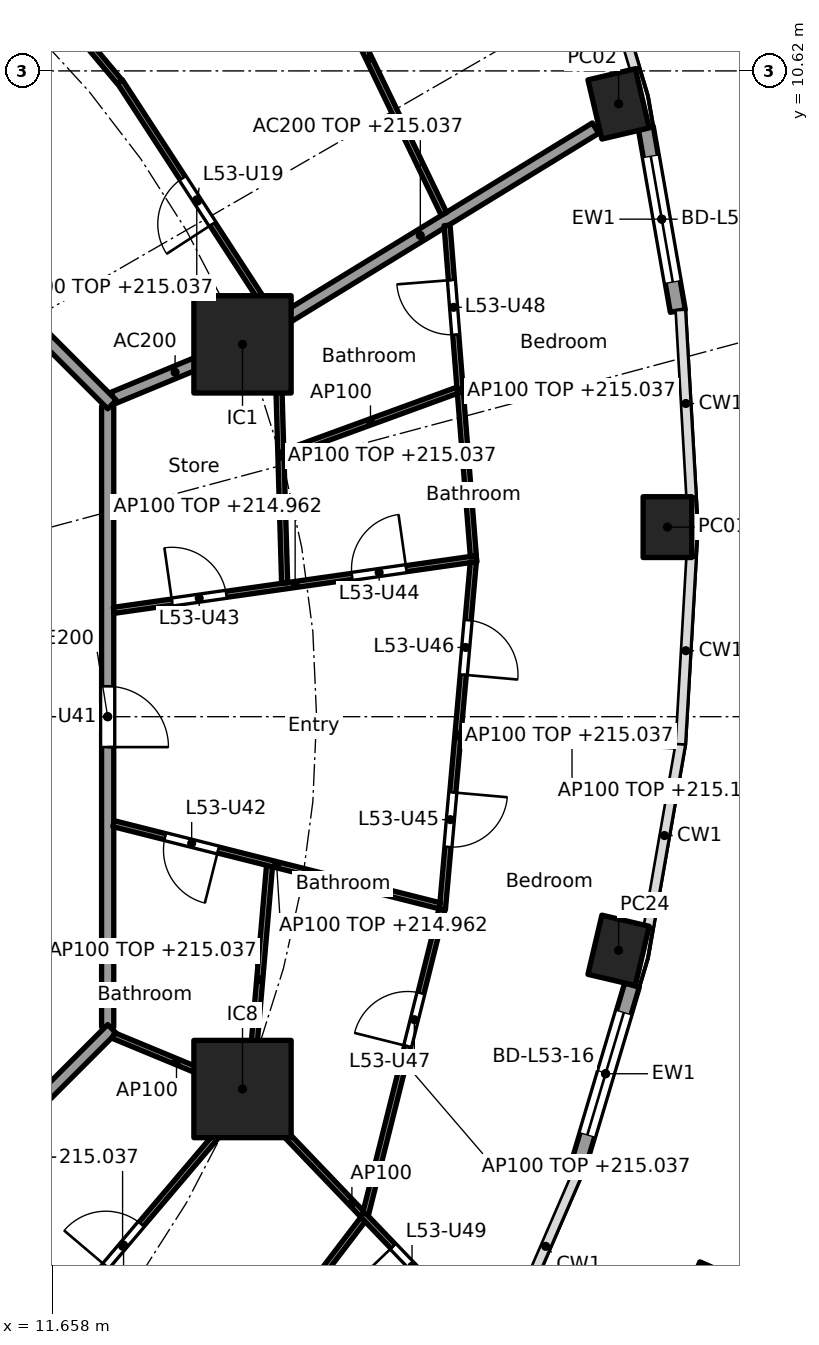
"""IFC4 building model, lengths in metres.
Left out: names, types, materials, properties, quantities, classifications, styles, units other than length and angle.
Written with IfcOpenShell. Run it as: python <this file> out.ifc"""

import sys

from ifc_helpers import new_model, si_unit, direction, frame, frame_2d, origin, origin_2d, place, context, subcontext, project, spatial, rectangle, hollow_rectangle, extrude, element, fill, save


model = new_model("IFC4")
c1 = context("Model", 3, precision=1e-05, world=origin(), true_north=direction((0.0, 1.0)))
c2 = subcontext(c1, "Body", "Model", "MODEL_VIEW")
j1 = project(units=[si_unit("LENGTHUNIT", "METRE"), si_unit("PLANEANGLEUNIT", "RADIAN")], contexts=[c1])
p1 = place(None, origin())
s1 = spatial("IfcSite", under=j1, at=p1, CompositionType="ELEMENT")
p2 = place(p1, origin())
s2 = spatial("IfcBuilding", under=s1, at=p2, CompositionType="ELEMENT")
p3 = place(p2, frame((0.0, 0.0, 212.2)))
s3 = spatial("IfcBuildingStorey", under=s2, at=p3, CompositionType="ELEMENT", Elevation=212.2)
for number, where, z_axis, x_axis in (
    (1, (21.77, 3.118, -0.26), (0.0, 0.0, 1.0), (0.0, 1.0, 0.0)),
    (2, (20.967, 10.077, -0.26), (0.0, 0.0, 1.0), (-0.229, 0.973, 0.0)),
    (3, (20.967, -3.842, -0.26), (0.0, 0.0, 1.0), (0.229, 0.973, 0.0)),
):
    element("IfcColumn", number, at=place(p3, frame(where, z_axis=z_axis, x_axis=x_axis)), inside=s3, PredefinedType="COLUMN", context=c2, shape_type="SweptSolid", body=[
        extrude(hollow_rectangle(XDim=1.0, YDim=0.8, WallThickness=0.032, at=origin_2d()), origin(), (0.0, 0.0, 1.0), 3.96),
    ])
for number, where, z_axis, x_axis in (
    (4, (14.782, 6.123, 0.0), (0.0, 0.0, 1.0), (1.0, 0.0, 0.0)),
    (5, (14.782, -6.123, 0.0), (0.0, 0.0, 1.0), (1.0, 0.0, 0.0)),
):
    element("IfcColumn", number, at=place(p3, frame(where, z_axis=z_axis, x_axis=x_axis)), inside=s3, PredefinedType="COLUMN", context=c2, shape_type="SweptSolid", body=[
        extrude(rectangle(XDim=1.6, YDim=1.6, at=origin_2d()), origin(), (0.0, 0.0, 1.0), 3.7),
    ])
p4 = place(p3, frame((21.413, 9.693, 0.0), z_axis=(0.0, 0.0, 1.0), x_axis=(0.172177583768, -0.985065926549, 0.0)))
e6 = element("IfcWall", 6, at=p4, inside=s3, PredefinedType="SOLIDWALL", context=c2, shape_type="SweptSolid", body=[
    extrude(rectangle(XDim=3.067, YDim=0.25, at=frame_2d((1.534, 0.0))), origin(), (0.0, 0.0, 1.0), 3.44),
])
p5 = place(p4, frame((0.484, 0.0, 0.0)))
e7 = element("IfcOpeningElement", 7, at=p5, cuts=e6, PredefinedType="OPENING", context=c2, shape_type="SweptSolid", body=[
    extrude(rectangle(XDim=2.1, YDim=2.4, at=frame_2d((1.05, 1.2))), frame((0.0, 0.135, 0.0), z_axis=(0.0, -1.0, 0.0), x_axis=(1.0, 0.0, 0.0)), (0.0, 0.0, 1.0), 0.27),
])
p6 = place(p3, frame((21.187, -4.415, 0.0), z_axis=(0.0, 0.0, 1.0), x_axis=(-0.285785716255, -0.958293548128, 0.0)))
e8 = element("IfcWall", 8, at=p6, inside=s3, PredefinedType="SOLIDWALL", context=c2, shape_type="SweptSolid", body=[
    extrude(rectangle(XDim=3.04, YDim=0.25, at=frame_2d((1.52, 0.0))), origin(), (0.0, 0.0, 1.0), 3.44),
])
p7 = place(p6, frame((0.47, 0.0, 0.0)))
e9 = element("IfcOpeningElement", 9, at=p7, cuts=e8, PredefinedType="OPENING", context=c2, shape_type="SweptSolid", body=[
    extrude(rectangle(XDim=2.1, YDim=2.4, at=frame_2d((1.05, 1.2))), frame((0.0, 0.135, 0.0), z_axis=(0.0, -1.0, 0.0), x_axis=(1.0, 0.0, 0.0)), (0.0, 0.0, 1.0), 0.27),
])
p8 = place(p3, frame((22.714, 16.705, 0.0), z_axis=(0.0, 0.0, 1.0), x_axis=(0.397501798616, -0.917601394995, 0.0)))
e10 = element("IfcWall", 10, at=p8, inside=s3, PredefinedType="SOLIDWALL", context=c2, shape_type="SweptSolid", body=[
    extrude(rectangle(XDim=10.248, YDim=1.6, at=frame_2d((5.124, 0.0))), origin(), (0.0, 0.0, 1.0), 1.1),
])
p9 = place(p3, frame((20.343, -15.443, 0.0), z_axis=(0.0, 0.0, 1.0), x_axis=(0.400883628547, 0.916128984567, 0.0)))
e11 = element("IfcWall", 11, at=p9, inside=s3, PredefinedType="SOLIDWALL", context=c2, shape_type="SweptSolid", body=[
    extrude(rectangle(XDim=6.72, YDim=1.6, at=frame_2d((3.36, 0.0))), origin(), (0.0, 0.0, 1.0), 1.1),
])
p10 = place(p3, frame((12.657, 5.243, 0.0), z_axis=(0.0, 0.0, 1.0), x_axis=(0.92383017907, 0.382802560388, 0.0)))
e12 = element("IfcWall", 12, at=p10, inside=s3, PredefinedType="PARTITIONING", context=c2, shape_type="SweptSolid", body=[
    extrude(rectangle(XDim=2.2, YDim=0.2, at=frame_2d((1.1, 0.0))), origin(), (0.0, 0.0, 1.0), 3.44),
])
p11 = place(p3, frame((14.825, 6.149, 0.0), z_axis=(0.0, 0.0, 1.0), x_axis=(0.852781365284, 0.522268075824, 0.0)))
e13 = element("IfcWall", 13, at=p11, inside=s3, PredefinedType="PARTITIONING", context=c2, shape_type="SweptSolid", body=[
    extrude(rectangle(XDim=6.758, YDim=0.2, at=frame_2d((3.379, 0.0))), origin(), (0.0, 0.0, 1.0), 2.837),
])
p12 = place(p3, frame((12.565, -5.104, 0.0), z_axis=(0.0, 0.0, 1.0), x_axis=(0.0, 1.0, 0.0)))
e14 = element("IfcWall", 14, at=p12, inside=s3, PredefinedType="PARTITIONING", context=c2, shape_type="SweptSolid", body=[
    extrude(rectangle(XDim=10.209, YDim=0.2, at=frame_2d((5.104, 0.0))), origin(), (0.0, 0.0, 1.0), 3.44),
])
p13 = place(p12, frame((4.604, 0.0, 0.0)))
e15 = element("IfcOpeningElement", 15, at=p13, cuts=e14, PredefinedType="OPENING", context=c2, shape_type="SweptSolid", body=[
    extrude(rectangle(XDim=1.0, YDim=2.1, at=frame_2d((0.5, 1.05))), frame((0.0, 0.11, 0.0), z_axis=(0.0, -1.0, 0.0), x_axis=(1.0, 0.0, 0.0)), (0.0, 0.0, 1.0), 0.22),
])
p14 = place(p3, frame((12.635, 5.134, 0.0), z_axis=(0.0, 0.0, 1.0), x_axis=(-0.707106781187, 0.707106781187, 0.0)))
e16 = element("IfcWall", 16, at=p14, inside=s3, PredefinedType="PARTITIONING", context=c2, shape_type="SweptSolid", body=[
    extrude(rectangle(XDim=10.609, YDim=0.2, at=frame_2d((5.305, 0.0))), origin(), (0.0, 0.0, 1.0), 3.44),
])
p15 = place(p3, frame((5.275, -12.494, 0.0), z_axis=(0.0, 0.0, 1.0), x_axis=(0.707106781187, 0.707106781187, 0.0)))
e17 = element("IfcWall", 17, at=p15, inside=s3, PredefinedType="PARTITIONING", context=c2, shape_type="SweptSolid", body=[
    extrude(rectangle(XDim=10.409, YDim=0.2, at=frame_2d((5.205, 0.0))), origin(), (0.0, 0.0, 1.0), 3.44),
])
p16 = place(p3, frame((12.664, 1.749, 0.0), z_axis=(0.0, 0.0, 1.0), x_axis=(0.990000460163, 0.141064130369, 0.0)))
e18 = element("IfcWall", 18, at=p16, inside=s3, PredefinedType="PARTITIONING", context=c2, shape_type="SweptSolid", body=[
    extrude(rectangle(XDim=6.028, YDim=0.1, at=frame_2d((3.014, 0.0))), origin(), (0.0, 0.0, 1.0), 2.762),
])
p17 = place(p16, frame((0.97, 0.0, 0.0)))
e19 = element("IfcOpeningElement", 19, at=p17, cuts=e18, PredefinedType="OPENING", context=c2, shape_type="SweptSolid", body=[
    extrude(rectangle(XDim=0.9, YDim=2.1, at=frame_2d((0.45, 1.05))), frame((0.0, 0.06, 0.0), z_axis=(0.0, -1.0, 0.0), x_axis=(1.0, 0.0, 0.0)), (0.0, 0.0, 1.0), 0.12),
])
p18 = place(p16, frame((3.959, 0.0, 0.0)))
e20 = element("IfcOpeningElement", 20, at=p18, cuts=e18, PredefinedType="OPENING", context=c2, shape_type="SweptSolid", body=[
    extrude(rectangle(XDim=0.9, YDim=2.1, at=frame_2d((0.45, 1.05))), frame((0.0, 0.06, 0.0), z_axis=(0.0, -1.0, 0.0), x_axis=(1.0, 0.0, 0.0)), (0.0, 0.0, 1.0), 0.12),
])
p19 = place(p3, frame((15.475, 2.2, 0.0), z_axis=(0.0, 0.0, 1.0), x_axis=(-0.029254623973, 0.999571991893, 0.0)))
e21 = element("IfcWall", 21, at=p19, inside=s3, PredefinedType="PARTITIONING", context=c2, shape_type="SweptSolid", body=[
    extrude(rectangle(XDim=4.173, YDim=0.1, at=frame_2d((2.086, 0.0))), origin(), (0.0, 0.0, 1.0), 2.837),
])
p20 = place(p3, frame((18.578, 2.642, 0.0), z_axis=(0.0, 0.0, 1.0), x_axis=(-0.079188322924, 0.996859673932, 0.0)))
e22 = element("IfcWall", 22, at=p20, inside=s3, PredefinedType="PARTITIONING", context=c2, shape_type="SweptSolid", body=[
    extrude(rectangle(XDim=5.454, YDim=0.1, at=frame_2d((2.727, 0.0))), origin(), (0.0, 0.0, 1.0), 2.837),
])
p21 = place(p20, frame((3.653, 0.0, 0.0)))
e23 = element("IfcOpeningElement", 23, at=p21, cuts=e22, PredefinedType="OPENING", context=c2, shape_type="SweptSolid", body=[
    extrude(rectangle(XDim=0.9, YDim=2.1, at=frame_2d((0.45, 1.05))), frame((0.0, 0.06, 0.0), z_axis=(0.0, -1.0, 0.0), x_axis=(1.0, 0.0, 0.0)), (0.0, 0.0, 1.0), 0.12),
])
p22 = place(p3, frame((18.578, 2.542, 0.0), z_axis=(0.0, 0.0, 1.0), x_axis=(-0.088651453697, -0.996062708748, 0.0)))
e24 = element("IfcWall", 24, at=p22, inside=s3, PredefinedType="PARTITIONING", context=c2, shape_type="SweptSolid", body=[
    extrude(rectangle(XDim=5.737, YDim=0.1, at=frame_2d((2.868, 0.0))), origin(), (0.0, 0.0, 1.0), 2.837),
])
p23 = place(p22, frame((3.802, 0.0, 0.0)))
e25 = element("IfcOpeningElement", 25, at=p23, cuts=e24, PredefinedType="OPENING", context=c2, shape_type="SweptSolid", body=[
    extrude(rectangle(XDim=0.9, YDim=2.1, at=frame_2d((0.45, 1.05))), frame((0.0, 0.06, 0.0), z_axis=(0.0, -1.0, 0.0), x_axis=(1.0, 0.0, 0.0)), (0.0, 0.0, 1.0), 0.12),
])
p24 = place(p22, frame((0.959, 0.0, 0.0)))
e26 = element("IfcOpeningElement", 26, at=p24, cuts=e24, PredefinedType="OPENING", context=c2, shape_type="SweptSolid", body=[
    extrude(rectangle(XDim=0.9, YDim=2.1, at=frame_2d((0.45, 1.05))), frame((0.0, 0.06, 0.0), z_axis=(0.0, -1.0, 0.0), x_axis=(1.0, 0.0, 0.0)), (0.0, 0.0, 1.0), 0.12),
])
p25 = place(p3, frame((15.46, 4.327, 0.0), z_axis=(0.0, 0.0, 1.0), x_axis=(0.939452643938, 0.342678755977, 0.0)))
e27 = element("IfcWall", 27, at=p25, inside=s3, PredefinedType="PARTITIONING", context=c2, shape_type="SweptSolid", body=[
    extrude(rectangle(XDim=3.037, YDim=0.1, at=frame_2d((1.519, 0.0))), origin(), (0.0, 0.0, 1.0), 3.44),
])
p26 = place(p3, frame((15.295, 6.554, 0.0), z_axis=(0.0, 0.0, 1.0), x_axis=(-0.545186120363, 0.838315032767, 0.0)))
e28 = element("IfcWall", 28, at=p26, inside=s3, PredefinedType="PARTITIONING", context=c2, shape_type="SweptSolid", body=[
    extrude(rectangle(XDim=4.643, YDim=0.1, at=frame_2d((2.321, 0.0))), origin(), (0.0, 0.0, 1.0), 2.837),
])
p27 = place(p26, frame((1.846, 0.0, 0.0)))
e29 = element("IfcOpeningElement", 29, at=p27, cuts=e28, PredefinedType="OPENING", context=c2, shape_type="SweptSolid", body=[
    extrude(rectangle(XDim=0.9, YDim=2.1, at=frame_2d((0.45, 1.05))), frame((0.0, 0.06, 0.0), z_axis=(0.0, -1.0, 0.0), x_axis=(1.0, 0.0, 0.0)), (0.0, 0.0, 1.0), 0.12),
])
p28 = place(p3, frame((18.095, 8.269, 0.0), z_axis=(0.0, 0.0, 1.0), x_axis=(-0.434640773561, 0.900603907363, 0.0)))
e30 = element("IfcWall", 30, at=p28, inside=s3, PredefinedType="PARTITIONING", context=c2, shape_type="SweptSolid", body=[
    extrude(rectangle(XDim=5.674, YDim=0.1, at=frame_2d((2.837, 0.0))), origin(), (0.0, 0.0, 1.0), 2.837),
])
p29 = place(p3, frame((12.759, 10.443, 0.0), z_axis=(0.0, 0.0, 1.0), x_axis=(-0.642225196965, 0.766516011825, 0.0)))
e31 = element("IfcWall", 31, at=p29, inside=s3, PredefinedType="PARTITIONING", context=c2, shape_type="SweptSolid", body=[
    extrude(rectangle(XDim=4.361, YDim=0.1, at=frame_2d((2.18, 0.0))), origin(), (0.0, 0.0, 1.0), 2.837),
])
p30 = place(p3, frame((7.71, 10.197, 0.0), z_axis=(0.0, 0.0, 1.0), x_axis=(0.521477621335, 0.853264959111, 0.0)))
e32 = element("IfcWall", 32, at=p30, inside=s3, PredefinedType="PARTITIONING", context=c2, shape_type="SweptSolid", body=[
    extrude(rectangle(XDim=8.941, YDim=0.1, at=frame_2d((4.471, 0.0))), origin(), (0.0, 0.0, 1.0), 2.762),
])
p31 = place(p30, frame((6.121, 0.0, 0.0)))
e33 = element("IfcOpeningElement", 33, at=p31, cuts=e32, PredefinedType="OPENING", context=c2, shape_type="SweptSolid", body=[
    extrude(rectangle(XDim=0.9, YDim=2.1, at=frame_2d((0.45, 1.05))), frame((0.0, 0.06, 0.0), z_axis=(0.0, -1.0, 0.0), x_axis=(1.0, 0.0, 0.0)), (0.0, 0.0, 1.0), 0.12),
])
p32 = place(p3, frame((10.753, -11.132, 0.0), z_axis=(0.0, 0.0, 1.0), x_axis=(0.647001799757, 0.762488472773, 0.0)))
e34 = element("IfcWall", 34, at=p32, inside=s3, PredefinedType="PARTITIONING", context=c2, shape_type="SweptSolid", body=[
    extrude(rectangle(XDim=6.359, YDim=0.1, at=frame_2d((3.179, 0.0))), origin(), (0.0, 0.0, 1.0), 2.837),
])
p33 = place(p32, frame((2.754, 0.0, 0.0)))
e35 = element("IfcOpeningElement", 35, at=p33, cuts=e34, PredefinedType="OPENING", context=c2, shape_type="SweptSolid", body=[
    extrude(rectangle(XDim=0.9, YDim=2.1, at=frame_2d((0.45, 1.05))), frame((0.0, 0.06, 0.0), z_axis=(0.0, -1.0, 0.0), x_axis=(1.0, 0.0, 0.0)), (0.0, 0.0, 1.0), 0.12),
])
p34 = place(p3, frame((12.782, -13.491, 0.0), z_axis=(0.0, 0.0, 1.0), x_axis=(0.606136140755, 0.795360911078, 0.0)))
e36 = element("IfcWall", 36, at=p34, inside=s3, PredefinedType="PARTITIONING", context=c2, shape_type="SweptSolid", body=[
    extrude(rectangle(XDim=6.57, YDim=0.1, at=frame_2d((3.285, 0.0))), origin(), (0.0, 0.0, 1.0), 2.837),
])
p35 = place(p34, frame((2.86, 0.0, 0.0)))
e37 = element("IfcOpeningElement", 37, at=p35, cuts=e36, PredefinedType="OPENING", context=c2, shape_type="SweptSolid", body=[
    extrude(rectangle(XDim=0.9, YDim=2.1, at=frame_2d((0.45, 1.05))), frame((0.0, 0.06, 0.0), z_axis=(0.0, -1.0, 0.0), x_axis=(1.0, 0.0, 0.0)), (0.0, 0.0, 1.0), 0.12),
])
p36 = place(p3, frame((12.657, -5.243, 0.0), z_axis=(0.0, 0.0, 1.0), x_axis=(0.923864733477, -0.382719158442, 0.0)))
e38 = element("IfcWall", 38, at=p36, inside=s3, PredefinedType="PARTITIONING", context=c2, shape_type="SweptSolid", body=[
    extrude(rectangle(XDim=2.25, YDim=0.1, at=frame_2d((1.125, 0.0))), origin(), (0.0, 0.0, 1.0), 3.44),
])
p37 = place(p3, frame((14.817, -6.159, 0.0), z_axis=(0.0, 0.0, 1.0), x_axis=(0.691437669875, -0.722436120828, 0.0)))
e39 = element("IfcWall", 39, at=p37, inside=s3, PredefinedType="PARTITIONING", context=c2, shape_type="SweptSolid", body=[
    extrude(rectangle(XDim=5.104, YDim=0.1, at=frame_2d((2.552, 0.0))), origin(), (0.0, 0.0, 1.0), 3.44),
])
p38 = place(p37, frame((3.532, 0.0, 0.0)))
e40 = element("IfcOpeningElement", 40, at=p38, cuts=e39, PredefinedType="OPENING", context=c2, shape_type="SweptSolid", body=[
    extrude(rectangle(XDim=0.9, YDim=2.1, at=frame_2d((0.45, 1.05))), frame((0.0, 0.06, 0.0), z_axis=(0.0, -1.0, 0.0), x_axis=(1.0, 0.0, 0.0)), (0.0, 0.0, 1.0), 0.12),
])
p39 = place(p3, frame((14.904, -6.196, 0.0), z_axis=(0.0, 0.0, 1.0), x_axis=(0.085843822439, 0.996308605879, 0.0)))
e41 = element("IfcWall", 41, at=p39, inside=s3, PredefinedType="PARTITIONING", context=c2, shape_type="SweptSolid", body=[
    extrude(rectangle(XDim=3.754, YDim=0.1, at=frame_2d((1.877, 0.0))), origin(), (0.0, 0.0, 1.0), 2.837),
])
p40 = place(p3, frame((16.807, -8.177, 0.0), z_axis=(0.0, 0.0, 1.0), x_axis=(0.243002985225, 0.970025540474, 0.0)))
e42 = element("IfcWall", 42, at=p40, inside=s3, PredefinedType="PARTITIONING", context=c2, shape_type="SweptSolid", body=[
    extrude(rectangle(XDim=5.162, YDim=0.1, at=frame_2d((2.581, 0.0))), origin(), (0.0, 0.0, 1.0), 2.837),
])
p41 = place(p40, frame((2.844, 0.0, 0.0)))
e43 = element("IfcOpeningElement", 43, at=p41, cuts=e42, PredefinedType="OPENING", context=c2, shape_type="SweptSolid", body=[
    extrude(rectangle(XDim=0.9, YDim=2.1, at=frame_2d((0.45, 1.05))), frame((0.0, 0.06, 0.0), z_axis=(0.0, -1.0, 0.0), x_axis=(1.0, 0.0, 0.0)), (0.0, 0.0, 1.0), 0.12),
])
p42 = place(p3, frame((12.662, -1.759, 0.0), z_axis=(0.0, 0.0, 1.0), x_axis=(0.969746519828, -0.24411408661, 0.0)))
e44 = element("IfcWall", 44, at=p42, inside=s3, PredefinedType="PARTITIONING", context=c2, shape_type="SweptSolid", body=[
    extrude(rectangle(XDim=5.531, YDim=0.1, at=frame_2d((2.765, 0.0))), origin(), (0.0, 0.0, 1.0), 2.762),
])
p43 = place(p42, frame((0.874, 0.0, 0.0)))
e45 = element("IfcOpeningElement", 45, at=p43, cuts=e44, PredefinedType="OPENING", context=c2, shape_type="SweptSolid", body=[
    extrude(rectangle(XDim=0.9, YDim=2.1, at=frame_2d((0.45, 1.05))), frame((0.0, 0.06, 0.0), z_axis=(0.0, -1.0, 0.0), x_axis=(1.0, 0.0, 0.0)), (0.0, 0.0, 1.0), 0.12),
])
p44 = place(p3, frame((18.378, -0.267, 0.0), z_axis=(0.0, 0.0, 1.0), x_axis=(0.998670331817, -0.051551608585, 0.0)))
e46 = element("IfcWall", 46, at=p44, inside=s3, PredefinedType="PARTITIONING", context=c2, shape_type="SweptSolid", body=[
    extrude(rectangle(XDim=3.651, YDim=0.1, at=frame_2d((1.826, 0.0))), origin(), (0.0, 0.0, 1.0), 2.983),
])
p45 = place(p5, origin())
e47 = element("IfcDoor", 47, at=p45, inside=s3, OperationType="SLIDING_TO_LEFT", PredefinedType="DOOR", context=c2, shape_type="SweptSolid", body=[
    extrude(rectangle(XDim=2.1, YDim=2.4, at=frame_2d((1.05, 1.2))), frame((0.0, 0.025, 0.0), z_axis=(0.0, -1.0, 0.0), x_axis=(1.0, 0.0, 0.0)), (0.0, 0.0, 1.0), 0.05),
])
fill(e7, e47)
p46 = place(p7, origin())
e48 = element("IfcDoor", 48, at=p46, inside=s3, OperationType="SLIDING_TO_LEFT", PredefinedType="DOOR", context=c2, shape_type="SweptSolid", body=[
    extrude(rectangle(XDim=2.1, YDim=2.4, at=frame_2d((1.05, 1.2))), frame((0.0, 0.025, 0.0), z_axis=(0.0, -1.0, 0.0), x_axis=(1.0, 0.0, 0.0)), (0.0, 0.0, 1.0), 0.05),
])
fill(e9, e48)
p47 = place(p27, origin())
e49 = element("IfcDoor", 49, at=p47, inside=s3, OperationType="SINGLE_SWING_LEFT", PredefinedType="DOOR", context=c2, shape_type="SweptSolid", body=[
    extrude(rectangle(XDim=0.9, YDim=2.1, at=frame_2d((0.45, 1.05))), frame((0.0, 0.025, 0.0), z_axis=(0.0, -1.0, 0.0), x_axis=(1.0, 0.0, 0.0)), (0.0, 0.0, 1.0), 0.05),
])
fill(e29, e49)
p48 = place(p13, frame((1.0, 0.0, 0.0), x_axis=(-1.0, 0.0, 0.0)))
e50 = element("IfcDoor", 50, at=p48, inside=s3, OperationType="SINGLE_SWING_RIGHT", PredefinedType="DOOR", context=c2, shape_type="SweptSolid", body=[
    extrude(rectangle(XDim=1.0, YDim=2.1, at=frame_2d((0.5, 1.05))), frame((0.0, 0.025, 0.0), z_axis=(0.0, -1.0, 0.0), x_axis=(1.0, 0.0, 0.0)), (0.0, 0.0, 1.0), 0.05),
])
fill(e15, e50)
p49 = place(p43, frame((0.9, 0.0, 0.0), x_axis=(-1.0, 0.0, 0.0)))
e51 = element("IfcDoor", 51, at=p49, inside=s3, OperationType="SINGLE_SWING_LEFT", PredefinedType="DOOR", context=c2, shape_type="SweptSolid", body=[
    extrude(rectangle(XDim=0.9, YDim=2.1, at=frame_2d((0.45, 1.05))), frame((0.0, 0.025, 0.0), z_axis=(0.0, -1.0, 0.0), x_axis=(1.0, 0.0, 0.0)), (0.0, 0.0, 1.0), 0.05),
])
fill(e45, e51)
p50 = place(p17, origin())
e52 = element("IfcDoor", 52, at=p50, inside=s3, OperationType="SINGLE_SWING_LEFT", PredefinedType="DOOR", context=c2, shape_type="SweptSolid", body=[
    extrude(rectangle(XDim=0.9, YDim=2.1, at=frame_2d((0.45, 1.05))), frame((0.0, 0.025, 0.0), z_axis=(0.0, -1.0, 0.0), x_axis=(1.0, 0.0, 0.0)), (0.0, 0.0, 1.0), 0.05),
])
fill(e19, e52)
p51 = place(p18, origin())
e53 = element("IfcDoor", 53, at=p51, inside=s3, OperationType="SINGLE_SWING_RIGHT", PredefinedType="DOOR", context=c2, shape_type="SweptSolid", body=[
    extrude(rectangle(XDim=0.9, YDim=2.1, at=frame_2d((0.45, 1.05))), frame((0.0, 0.025, 0.0), z_axis=(0.0, -1.0, 0.0), x_axis=(1.0, 0.0, 0.0)), (0.0, 0.0, 1.0), 0.05),
])
fill(e20, e53)
p52 = place(p23, origin())
e54 = element("IfcDoor", 54, at=p52, inside=s3, OperationType="SINGLE_SWING_LEFT", PredefinedType="DOOR", context=c2, shape_type="SweptSolid", body=[
    extrude(rectangle(XDim=0.9, YDim=2.1, at=frame_2d((0.45, 1.05))), frame((0.0, 0.025, 0.0), z_axis=(0.0, -1.0, 0.0), x_axis=(1.0, 0.0, 0.0)), (0.0, 0.0, 1.0), 0.05),
])
fill(e25, e54)
p53 = place(p24, origin())
e55 = element("IfcDoor", 55, at=p53, inside=s3, OperationType="SINGLE_SWING_RIGHT", PredefinedType="DOOR", context=c2, shape_type="SweptSolid", body=[
    extrude(rectangle(XDim=0.9, YDim=2.1, at=frame_2d((0.45, 1.05))), frame((0.0, 0.025, 0.0), z_axis=(0.0, -1.0, 0.0), x_axis=(1.0, 0.0, 0.0)), (0.0, 0.0, 1.0), 0.05),
])
fill(e26, e55)
p54 = place(p41, origin())
e56 = element("IfcDoor", 56, at=p54, inside=s3, OperationType="SINGLE_SWING_LEFT", PredefinedType="DOOR", context=c2, shape_type="SweptSolid", body=[
    extrude(rectangle(XDim=0.9, YDim=2.1, at=frame_2d((0.45, 1.05))), frame((0.0, 0.025, 0.0), z_axis=(0.0, -1.0, 0.0), x_axis=(1.0, 0.0, 0.0)), (0.0, 0.0, 1.0), 0.05),
])
fill(e43, e56)
p55 = place(p21, origin())
e57 = element("IfcDoor", 57, at=p55, inside=s3, OperationType="SINGLE_SWING_RIGHT", PredefinedType="DOOR", context=c2, shape_type="SweptSolid", body=[
    extrude(rectangle(XDim=0.9, YDim=2.1, at=frame_2d((0.45, 1.05))), frame((0.0, 0.025, 0.0), z_axis=(0.0, -1.0, 0.0), x_axis=(1.0, 0.0, 0.0)), (0.0, 0.0, 1.0), 0.05),
])
fill(e23, e57)
p56 = place(p38, frame((0.9, 0.0, 0.0), x_axis=(-1.0, 0.0, 0.0)))
e58 = element("IfcDoor", 58, at=p56, inside=s3, OperationType="SINGLE_SWING_RIGHT", PredefinedType="DOOR", context=c2, shape_type="SweptSolid", body=[
    extrude(rectangle(XDim=0.9, YDim=2.1, at=frame_2d((0.45, 1.05))), frame((0.0, 0.025, 0.0), z_axis=(0.0, -1.0, 0.0), x_axis=(1.0, 0.0, 0.0)), (0.0, 0.0, 1.0), 0.05),
])
fill(e40, e58)
p57 = place(p33, origin())
e59 = element("IfcDoor", 59, at=p57, inside=s3, OperationType="SINGLE_SWING_LEFT", PredefinedType="DOOR", context=c2, shape_type="SweptSolid", body=[
    extrude(rectangle(XDim=0.9, YDim=2.1, at=frame_2d((0.45, 1.05))), frame((0.0, 0.025, 0.0), z_axis=(0.0, -1.0, 0.0), x_axis=(1.0, 0.0, 0.0)), (0.0, 0.0, 1.0), 0.05),
])
fill(e35, e59)
save(model, sys.argv[1])
